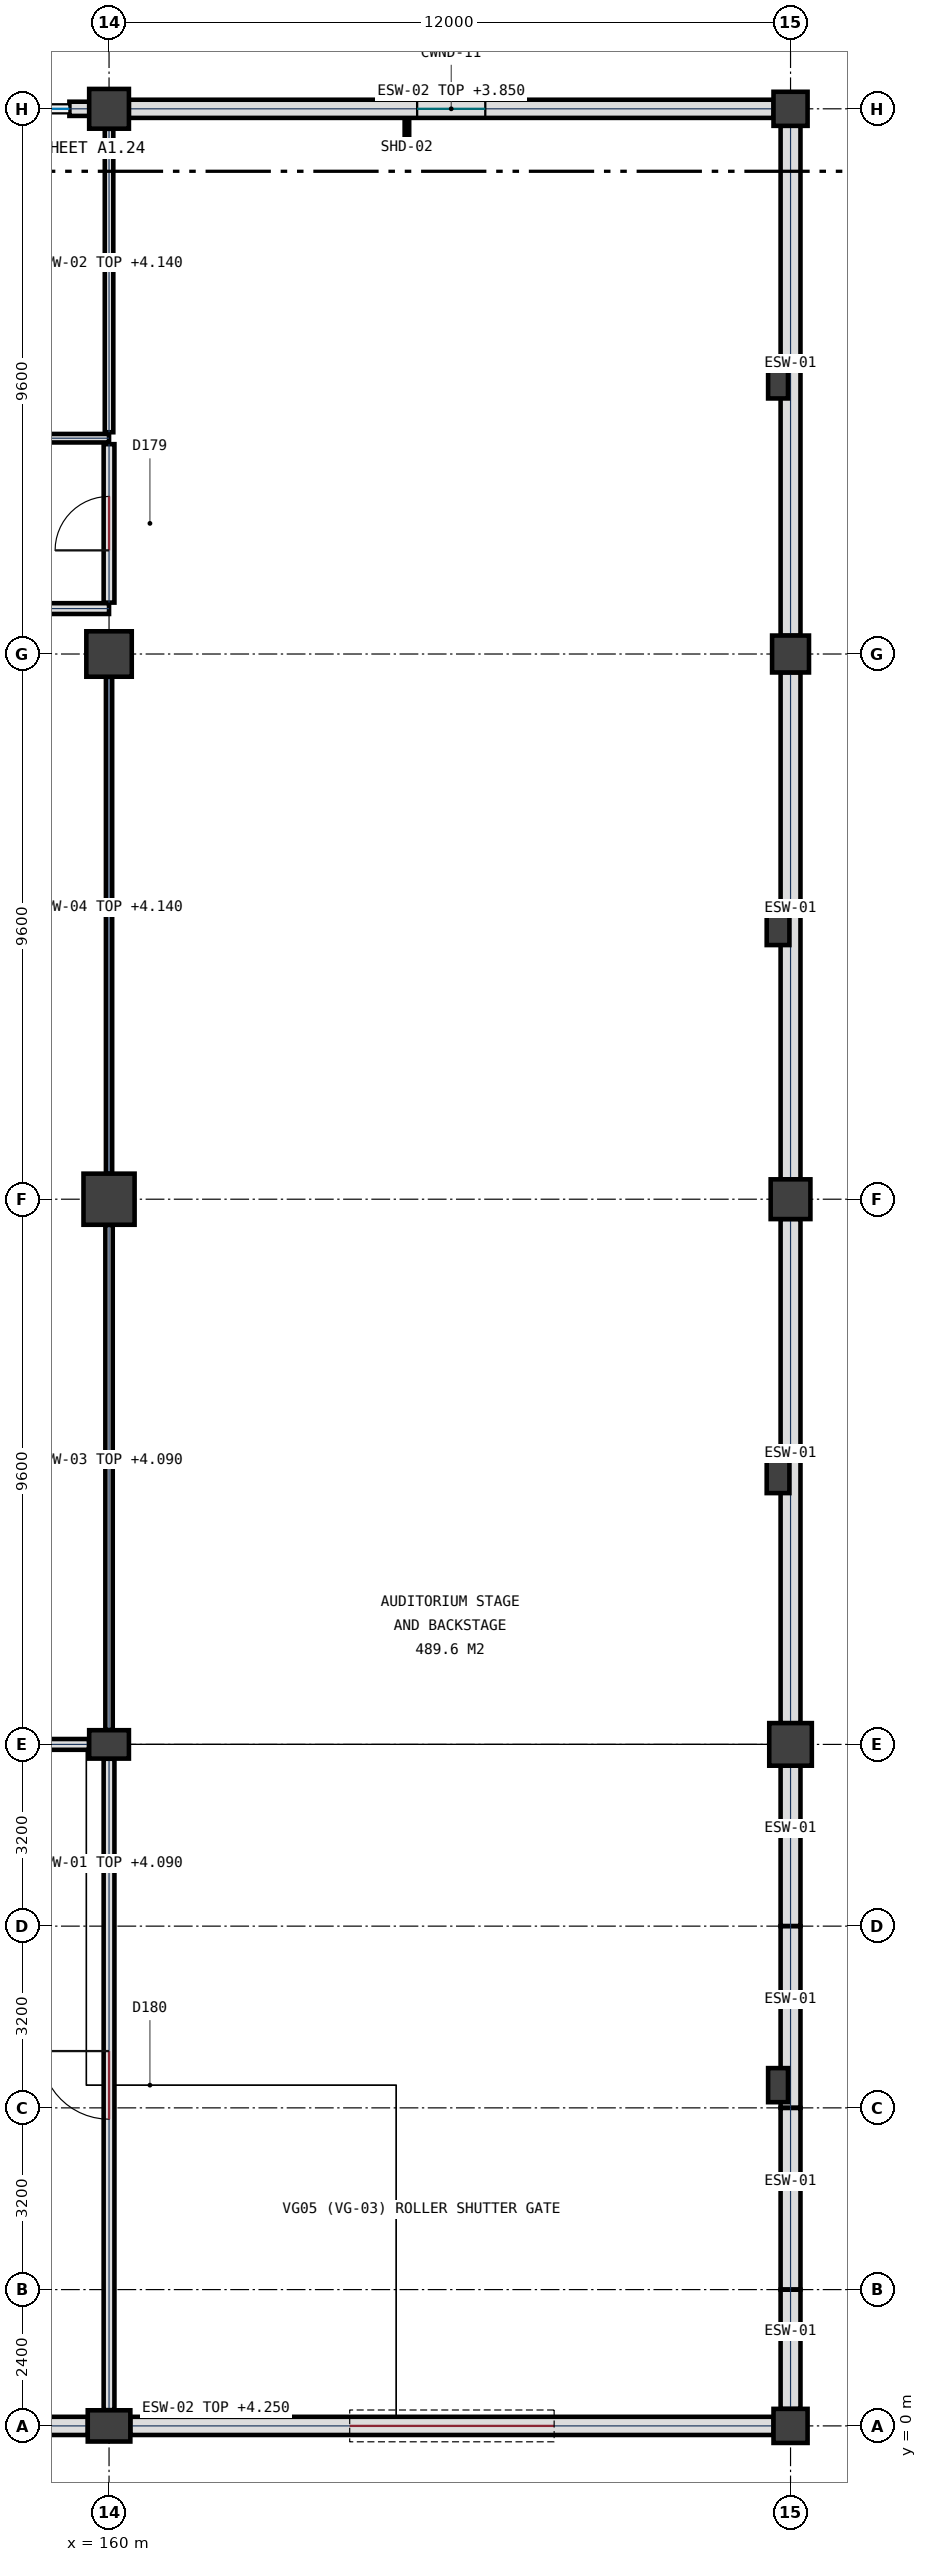
"""IFC4 building model, lengths in metres.
Left out: names, types, materials, properties, quantities, classifications, styles, units other than length and angle.
Written with IfcOpenShell. Run it as: python <this file> out.ifc"""

import sys

from ifc_helpers import new_model, si_unit, direction, frame, frame_2d, origin, origin_2d, place, context, subcontext, project, spatial, rectangle, circle, extrude, element, fill, save


model = new_model("IFC4")
c1 = context("Model", 3, precision=1e-05, world=origin(), true_north=direction((0.0, 1.0)))
c2 = subcontext(c1, "Body", "Model", "MODEL_VIEW")
j1 = project(units=[si_unit("LENGTHUNIT", "METRE"), si_unit("PLANEANGLEUNIT", "RADIAN")], contexts=[c1])
p1 = place(None, origin())
s1 = spatial("IfcSite", under=j1, at=p1, CompositionType="ELEMENT")
p2 = place(p1, origin())
s2 = spatial("IfcBuilding", under=s1, at=p2, CompositionType="ELEMENT")
p3 = place(p2, origin())
s3 = spatial("IfcBuildingStorey", under=s2, at=p3, CompositionType="ELEMENT", Elevation=0.0)
p4 = place(p3, frame((160.0, 0.0, 0.0), z_axis=(0.0, 0.0, 1.0), x_axis=(1.0, 0.0, 0.0)))
e1 = element("IfcColumn", 1, at=p4, inside=s3, PredefinedType="COLUMN", context=c2, shape_type="SweptSolid", body=[
    extrude(rectangle(XDim=0.75, YDim=0.55, at=origin_2d()), origin(), (0.0, 0.0, 1.0), 5.4),
])
p5 = place(p3, frame((160.0, 12.0, 0.0), z_axis=(0.0, 0.0, 1.0), x_axis=(1.0, 0.0, 0.0)))
e2 = element("IfcColumn", 2, at=p5, inside=s3, PredefinedType="COLUMN", context=c2, shape_type="SweptSolid", body=[
    extrude(rectangle(XDim=0.7, YDim=0.5, at=origin_2d()), origin(), (0.0, 0.0, 1.0), 5.4),
])
p6 = place(p3, frame((160.0, 21.6, 0.0), z_axis=(0.0, 0.0, 1.0), x_axis=(1.0, 0.0, 0.0)))
e3 = element("IfcColumn", 3, at=p6, inside=s3, PredefinedType="COLUMN", context=c2, shape_type="SweptSolid", body=[
    extrude(circle(Radius=0.45, at=origin_2d()), origin(), (0.0, 0.0, 1.0), 5.4),
])
p7 = place(p3, frame((160.0, 31.2, 0.0), z_axis=(0.0, 0.0, 1.0), x_axis=(1.0, 0.0, 0.0)))
e4 = element("IfcColumn", 4, at=p7, inside=s3, PredefinedType="COLUMN", context=c2, shape_type="SweptSolid", body=[
    extrude(circle(Radius=0.4, at=origin_2d()), origin(), (0.0, 0.0, 1.0), 5.4),
])
p8 = place(p3, frame((160.0, 40.8, 0.0), z_axis=(0.0, 0.0, 1.0), x_axis=(1.0, 0.0, 0.0)))
e5 = element("IfcColumn", 5, at=p8, inside=s3, PredefinedType="COLUMN", context=c2, shape_type="SweptSolid", body=[
    extrude(circle(Radius=0.35, at=origin_2d()), origin(), (0.0, 0.0, 1.0), 5.4),
])
p9 = place(p3, frame((172.0, 0.0, 0.0), z_axis=(0.0, 0.0, 1.0), x_axis=(1.0, 0.0, 0.0)))
e6 = element("IfcColumn", 6, at=p9, inside=s3, PredefinedType="COLUMN", context=c2, shape_type="SweptSolid", body=[
    extrude(circle(Radius=0.3, at=origin_2d()), origin(), (0.0, 0.0, 1.0), 5.4),
])
p10 = place(p3, frame((172.0, 12.0, 0.0), z_axis=(0.0, 0.0, 1.0), x_axis=(1.0, 0.0, 0.0)))
e7 = element("IfcColumn", 7, at=p10, inside=s3, PredefinedType="COLUMN", context=c2, shape_type="SweptSolid", body=[
    extrude(rectangle(XDim=0.75, YDim=0.75, at=origin_2d()), origin(), (0.0, 0.0, 1.0), 5.4),
])
p11 = place(p3, frame((172.0, 21.6, 0.0), z_axis=(0.0, 0.0, 1.0), x_axis=(1.0, 0.0, 0.0)))
e8 = element("IfcColumn", 8, at=p11, inside=s3, PredefinedType="COLUMN", context=c2, shape_type="SweptSolid", body=[
    extrude(rectangle(XDim=0.7, YDim=0.7, at=origin_2d()), origin(), (0.0, 0.0, 1.0), 5.4),
])
p12 = place(p3, frame((172.0, 31.2, 0.0), z_axis=(0.0, 0.0, 1.0), x_axis=(1.0, 0.0, 0.0)))
e9 = element("IfcColumn", 9, at=p12, inside=s3, PredefinedType="COLUMN", context=c2, shape_type="SweptSolid", body=[
    extrude(rectangle(XDim=0.65, YDim=0.65, at=origin_2d()), origin(), (0.0, 0.0, 1.0), 5.4),
])
p13 = place(p3, frame((172.0, 40.8, 0.0), z_axis=(0.0, 0.0, 1.0), x_axis=(1.0, 0.0, 0.0)))
e10 = element("IfcColumn", 10, at=p13, inside=s3, PredefinedType="COLUMN", context=c2, shape_type="SweptSolid", body=[
    extrude(rectangle(XDim=0.6, YDim=0.6, at=origin_2d()), origin(), (0.0, 0.0, 1.0), 5.4),
])
p14 = place(p3, frame((171.78, 6.0, 0.0), z_axis=(0.0, 0.0, 1.0), x_axis=(1.0, 0.0, 0.0)))
e11 = element("IfcColumn", 11, at=p14, inside=s3, PredefinedType="PILASTER", context=c2, shape_type="SweptSolid", body=[
    extrude(rectangle(XDim=0.35, YDim=0.6, at=origin_2d()), origin(), (0.0, 0.0, 1.0), 5.4),
])
p15 = place(p3, frame((171.78, 16.8, 0.0), z_axis=(0.0, 0.0, 1.0), x_axis=(1.0, 0.0, 0.0)))
e12 = element("IfcColumn", 12, at=p15, inside=s3, PredefinedType="PILASTER", context=c2, shape_type="SweptSolid", body=[
    extrude(rectangle(XDim=0.4, YDim=0.75, at=origin_2d()), origin(), (0.0, 0.0, 1.0), 5.4),
])
p16 = place(p3, frame((171.78, 26.4, 0.0), z_axis=(0.0, 0.0, 1.0), x_axis=(1.0, 0.0, 0.0)))
e13 = element("IfcColumn", 13, at=p16, inside=s3, PredefinedType="PILASTER", context=c2, shape_type="SweptSolid", body=[
    extrude(rectangle(XDim=0.4, YDim=0.65, at=origin_2d()), origin(), (0.0, 0.0, 1.0), 5.4),
])
p17 = place(p3, frame((171.78, 36.0, 0.0), z_axis=(0.0, 0.0, 1.0), x_axis=(1.0, 0.0, 0.0)))
e14 = element("IfcColumn", 14, at=p17, inside=s3, PredefinedType="PILASTER", context=c2, shape_type="SweptSolid", body=[
    extrude(rectangle(XDim=0.35, YDim=0.6, at=origin_2d()), origin(), (0.0, 0.0, 1.0), 5.4),
])
p18 = place(p3, frame((159.302, 40.8, 0.0), z_axis=(0.0, 0.0, 1.0), x_axis=(1.0, 0.0, 0.0)))
e15 = element("IfcWall", 15, at=p18, inside=s3, PredefinedType="SOLIDWALL", context=c2, shape_type="SweptSolid", body=[
    extrude(rectangle(XDim=0.35, YDim=0.25, at=frame_2d((0.175, 0.0))), origin(), (0.0, 0.0, 1.0), 4.14),
])
p19 = place(p3, frame((160.348, 40.8, 0.0), z_axis=(0.0, 0.0, 1.0), x_axis=(1.0, 0.0, 0.0)))
e16 = element("IfcWall", 16, at=p19, inside=s3, PredefinedType="SOLIDWALL", context=c2, shape_type="SweptSolid", body=[
    extrude(rectangle(XDim=11.354, YDim=0.32, at=frame_2d((5.677, 0.0))), origin(), (0.0, 0.0, 1.0), 3.85),
])
p20 = place(p19, frame((5.077, 0.0, 0.95)))
e17 = element("IfcOpeningElement", 17, at=p20, cuts=e16, PredefinedType="OPENING", context=c2, shape_type="SweptSolid", body=[
    extrude(rectangle(XDim=1.2, YDim=1.35, at=frame_2d((0.6, 0.675))), frame((0.0, 0.17, 0.0), z_axis=(0.0, -1.0, 0.0), x_axis=(1.0, 0.0, 0.0)), (0.0, 0.0, 1.0), 0.34),
])
p21 = place(p3, frame((172.0, 40.502, 0.0), z_axis=(0.0, 0.0, 1.0), x_axis=(0.0, -1.0, 0.0)))
e18 = element("IfcWall", 18, at=p21, inside=s3, PredefinedType="SOLIDWALL", context=c2, shape_type="SweptSolid", body=[
    extrude(rectangle(XDim=8.979, YDim=0.35, at=frame_2d((4.49, 0.0))), origin(), (0.0, 0.0, 1.0), 5.1),
])
p22 = place(p3, frame((172.0, 30.877, 0.0), z_axis=(0.0, 0.0, 1.0), x_axis=(0.0, -1.0, 0.0)))
e19 = element("IfcWall", 19, at=p22, inside=s3, PredefinedType="SOLIDWALL", context=c2, shape_type="SweptSolid", body=[
    extrude(rectangle(XDim=8.929, YDim=0.35, at=frame_2d((4.464, 0.0))), origin(), (0.0, 0.0, 1.0), 5.1),
])
p23 = place(p3, frame((172.0, 21.252, 0.0), z_axis=(0.0, 0.0, 1.0), x_axis=(0.0, -1.0, 0.0)))
e20 = element("IfcWall", 20, at=p23, inside=s3, PredefinedType="SOLIDWALL", context=c2, shape_type="SweptSolid", body=[
    extrude(rectangle(XDim=8.879, YDim=0.35, at=frame_2d((4.439, 0.0))), origin(), (0.0, 0.0, 1.0), 5.1),
])
p24 = place(p3, frame((172.0, 11.627, 0.0), z_axis=(0.0, 0.0, 1.0), x_axis=(0.0, -1.0, 0.0)))
e21 = element("IfcWall", 21, at=p24, inside=s3, PredefinedType="SOLIDWALL", context=c2, shape_type="SweptSolid", body=[
    extrude(rectangle(XDim=2.825, YDim=0.35, at=frame_2d((1.413, 0.0))), origin(), (0.0, 0.0, 1.0), 5.16),
])
p25 = place(p3, frame((172.0, 8.798, 0.0), z_axis=(0.0, 0.0, 1.0), x_axis=(0.0, -1.0, 0.0)))
e22 = element("IfcWall", 22, at=p25, inside=s3, PredefinedType="SOLIDWALL", context=c2, shape_type="SweptSolid", body=[
    extrude(rectangle(XDim=3.196, YDim=0.35, at=frame_2d((1.598, 0.0))), origin(), (0.0, 0.0, 1.0), 5.16),
])
p26 = place(p3, frame((172.0, 5.598, 0.0), z_axis=(0.0, 0.0, 1.0), x_axis=(0.0, -1.0, 0.0)))
e23 = element("IfcWall", 23, at=p26, inside=s3, PredefinedType="SOLIDWALL", context=c2, shape_type="SweptSolid", body=[
    extrude(rectangle(XDim=3.196, YDim=0.35, at=frame_2d((1.598, 0.0))), origin(), (0.0, 0.0, 1.0), 5.16),
])
p27 = place(p3, frame((172.0, 2.398, 0.0), z_axis=(0.0, 0.0, 1.0), x_axis=(0.0, -1.0, 0.0)))
e24 = element("IfcWall", 24, at=p27, inside=s3, PredefinedType="SOLIDWALL", context=c2, shape_type="SweptSolid", body=[
    extrude(rectangle(XDim=2.1, YDim=0.35, at=frame_2d((1.05, 0.0))), origin(), (0.0, 0.0, 1.0), 5.16),
])
p28 = place(p3, frame((171.702, 0.0, 0.0), z_axis=(0.0, 0.0, 1.0), x_axis=(-1.0, 0.0, 0.0)))
e25 = element("IfcWall", 25, at=p28, inside=s3, PredefinedType="SOLIDWALL", context=c2, shape_type="SweptSolid", body=[
    extrude(rectangle(XDim=11.329, YDim=0.32, at=frame_2d((5.665, 0.0))), origin(), (0.0, 0.0, 1.0), 4.25),
])
p29 = place(p28, frame((3.865, 0.0, 0.0)))
e26 = element("IfcOpeningElement", 26, at=p29, cuts=e25, PredefinedType="OPENING", context=c2, shape_type="SweptSolid", body=[
    extrude(rectangle(XDim=3.6, YDim=3.05, at=frame_2d((1.8, 1.525))), frame((0.0, 0.17, 0.0), z_axis=(0.0, -1.0, 0.0), x_axis=(1.0, 0.0, 0.0)), (0.0, 0.0, 1.0), 0.34),
])
p30 = place(p3, frame((159.627, 0.0, 0.0), z_axis=(0.0, 0.0, 1.0), x_axis=(-1.0, 0.0, 0.0)))
e27 = element("IfcWall", 27, at=p30, inside=s3, PredefinedType="SOLIDWALL", context=c2, shape_type="SweptSolid", body=[
    extrude(rectangle(XDim=12.079, YDim=0.32, at=frame_2d((6.04, 0.0))), origin(), (0.0, 0.0, 1.0), 4.3),
])
p31 = place(p30, frame((4.24, 0.0, 0.0)))
e28 = element("IfcOpeningElement", 28, at=p31, cuts=e27, PredefinedType="OPENING", context=c2, shape_type="SweptSolid", body=[
    extrude(rectangle(XDim=3.6, YDim=3.05, at=frame_2d((1.8, 1.525))), frame((0.0, 0.17, 0.0), z_axis=(0.0, -1.0, 0.0), x_axis=(1.0, 0.0, 0.0)), (0.0, 0.0, 1.0), 0.34),
])
p32 = place(p3, frame((147.528, 12.0, 0.0), z_axis=(0.0, 0.0, 1.0), x_axis=(1.0, 0.0, 0.0)))
e29 = element("IfcWall", 29, at=p32, inside=s3, PredefinedType="PARTITIONING", context=c2, shape_type="SweptSolid", body=[
    extrude(rectangle(XDim=12.119, YDim=0.19, at=frame_2d((6.06, 0.0))), origin(), (0.0, 0.0, 1.0), 4.09),
])
p33 = place(p3, frame((160.0, 0.278, 0.0), z_axis=(0.0, 0.0, 1.0), x_axis=(0.0, 1.0, 0.0)))
e30 = element("IfcWall", 30, at=p33, inside=s3, PredefinedType="PARTITIONING", context=c2, shape_type="SweptSolid", body=[
    extrude(rectangle(XDim=11.469, YDim=0.19, at=frame_2d((5.734, 0.0))), origin(), (0.0, 0.0, 1.0), 4.09),
])
p34 = place(p33, frame((5.122, 0.0, 0.0)))
e31 = element("IfcOpeningElement", 31, at=p34, cuts=e30, PredefinedType="OPENING", context=c2, shape_type="SweptSolid", body=[
    extrude(rectangle(XDim=1.2, YDim=2.2, at=frame_2d((0.6, 1.1))), frame((0.0, 0.105, 0.0), z_axis=(0.0, -1.0, 0.0), x_axis=(1.0, 0.0, 0.0)), (0.0, 0.0, 1.0), 0.21),
])
p35 = place(p3, frame((129.5, 32.0, 0.0), z_axis=(0.0, 0.0, 1.0), x_axis=(1.0, 0.0, 0.0)))
e32 = element("IfcWall", 32, at=p35, inside=s3, PredefinedType="PARTITIONING", context=c2, shape_type="SweptSolid", body=[
    extrude(rectangle(XDim=30.5, YDim=0.19, at=frame_2d((15.25, 0.0))), origin(), (0.0, 0.0, 1.0), 4.14),
])
p36 = place(p35, frame((14.575, 0.0, 0.0)))
e33 = element("IfcOpeningElement", 33, at=p36, cuts=e32, PredefinedType="OPENING", context=c2, shape_type="SweptSolid", body=[
    extrude(rectangle(XDim=1.85, YDim=2.35, at=frame_2d((0.925, 1.175))), frame((0.0, 0.105, 0.0), z_axis=(0.0, -1.0, 0.0), x_axis=(1.0, 0.0, 0.0)), (0.0, 0.0, 1.0), 0.21),
])
p37 = place(p3, frame((129.5, 35.0, 0.0), z_axis=(0.0, 0.0, 1.0), x_axis=(1.0, 0.0, 0.0)))
e34 = element("IfcWall", 34, at=p37, inside=s3, PredefinedType="PARTITIONING", context=c2, shape_type="SweptSolid", body=[
    extrude(rectangle(XDim=30.5, YDim=0.15, at=frame_2d((15.25, 0.0))), origin(), (0.0, 0.0, 1.0), 4.14),
])
p38 = place(p37, frame((10.575, 0.0, 0.0)))
e35 = element("IfcOpeningElement", 35, at=p38, cuts=e34, PredefinedType="OPENING", context=c2, shape_type="SweptSolid", body=[
    extrude(rectangle(XDim=1.85, YDim=2.35, at=frame_2d((0.925, 1.175))), frame((0.0, 0.085, 0.0), z_axis=(0.0, -1.0, 0.0), x_axis=(1.0, 0.0, 0.0)), (0.0, 0.0, 1.0), 0.17),
])
p39 = place(p3, frame((160.0, 12.253, 0.0), z_axis=(0.0, 0.0, 1.0), x_axis=(0.0, 1.0, 0.0)))
e36 = element("IfcWall", 36, at=p39, inside=s3, PredefinedType="PARTITIONING", context=c2, shape_type="SweptSolid", body=[
    extrude(rectangle(XDim=8.894, YDim=0.13, at=frame_2d((4.447, 0.0))), origin(), (0.0, 0.0, 1.0), 4.09),
])
p40 = place(p3, frame((160.0, 22.053, 0.0), z_axis=(0.0, 0.0, 1.0), x_axis=(0.0, 1.0, 0.0)))
e37 = element("IfcWall", 37, at=p40, inside=s3, PredefinedType="PARTITIONING", context=c2, shape_type="SweptSolid", body=[
    extrude(rectangle(XDim=8.744, YDim=0.11, at=frame_2d((4.372, 0.0))), origin(), (0.0, 0.0, 1.0), 4.14),
])
p41 = place(p3, frame((160.0, 32.105, 0.0), z_axis=(0.0, 0.0, 1.0), x_axis=(0.0, 1.0, 0.0)))
e38 = element("IfcWall", 38, at=p41, inside=s3, PredefinedType="PARTITIONING", context=c2, shape_type="SweptSolid", body=[
    extrude(rectangle(XDim=2.79, YDim=0.19, at=frame_2d((1.395, 0.0))), origin(), (0.0, 0.0, 1.0), 4.14),
])
p42 = place(p41, frame((0.92, 0.0, 0.0)))
e39 = element("IfcOpeningElement", 39, at=p42, cuts=e38, PredefinedType="OPENING", context=c2, shape_type="SweptSolid", body=[
    extrude(rectangle(XDim=0.95, YDim=2.15, at=frame_2d((0.475, 1.075))), frame((0.0, 0.105, 0.0), z_axis=(0.0, -1.0, 0.0), x_axis=(1.0, 0.0, 0.0)), (0.0, 0.0, 1.0), 0.21),
])
p43 = place(p3, frame((160.0, 35.105, 0.0), z_axis=(0.0, 0.0, 1.0), x_axis=(0.0, 1.0, 0.0)))
e40 = element("IfcWall", 40, at=p43, inside=s3, PredefinedType="PARTITIONING", context=c2, shape_type="SweptSolid", body=[
    extrude(rectangle(XDim=5.342, YDim=0.15, at=frame_2d((2.671, 0.0))), origin(), (0.0, 0.0, 1.0), 4.14),
])
p44 = place(p20, origin())
e41 = element("IfcWindow", 41, at=p44, inside=s3, PartitioningType="SINGLE_PANEL", PredefinedType="WINDOW", context=c2, shape_type="SweptSolid", body=[
    extrude(rectangle(XDim=1.2, YDim=1.35, at=frame_2d((0.6, 0.675))), frame((0.0, 0.032, 0.0), z_axis=(0.0, -1.0, 0.0), x_axis=(1.0, 0.0, 0.0)), (0.0, 0.0, 1.0), 0.065),
])
fill(e17, e41)
p45 = place(p29, origin())
e42 = element("IfcDoor", 42, at=p45, inside=s3, OperationType="ROLLINGUP", PredefinedType="GATE", context=c2, shape_type="SweptSolid", body=[
    extrude(rectangle(XDim=3.6, YDim=3.05, at=frame_2d((1.8, 1.525))), frame((0.0, 0.032, 0.0), z_axis=(0.0, -1.0, 0.0), x_axis=(1.0, 0.0, 0.0)), (0.0, 0.0, 1.0), 0.065),
])
fill(e26, e42)
p46 = place(p42, origin())
e43 = element("IfcDoor", 43, at=p46, inside=s3, OperationType="SINGLE_SWING_LEFT", PredefinedType="DOOR", context=c2, shape_type="SweptSolid", body=[
    extrude(rectangle(XDim=0.95, YDim=2.15, at=frame_2d((0.475, 1.075))), frame((0.0, 0.032, 0.0), z_axis=(0.0, -1.0, 0.0), x_axis=(1.0, 0.0, 0.0)), (0.0, 0.0, 1.0), 0.065),
])
fill(e39, e43)
p47 = place(p34, origin())
e44 = element("IfcDoor", 44, at=p47, inside=s3, OperationType="SINGLE_SWING_RIGHT", PredefinedType="DOOR", context=c2, shape_type="SweptSolid", body=[
    extrude(rectangle(XDim=1.2, YDim=2.2, at=frame_2d((0.6, 1.1))), frame((0.0, 0.032, 0.0), z_axis=(0.0, -1.0, 0.0), x_axis=(1.0, 0.0, 0.0)), (0.0, 0.0, 1.0), 0.065),
])
fill(e31, e44)
save(model, sys.argv[1])
